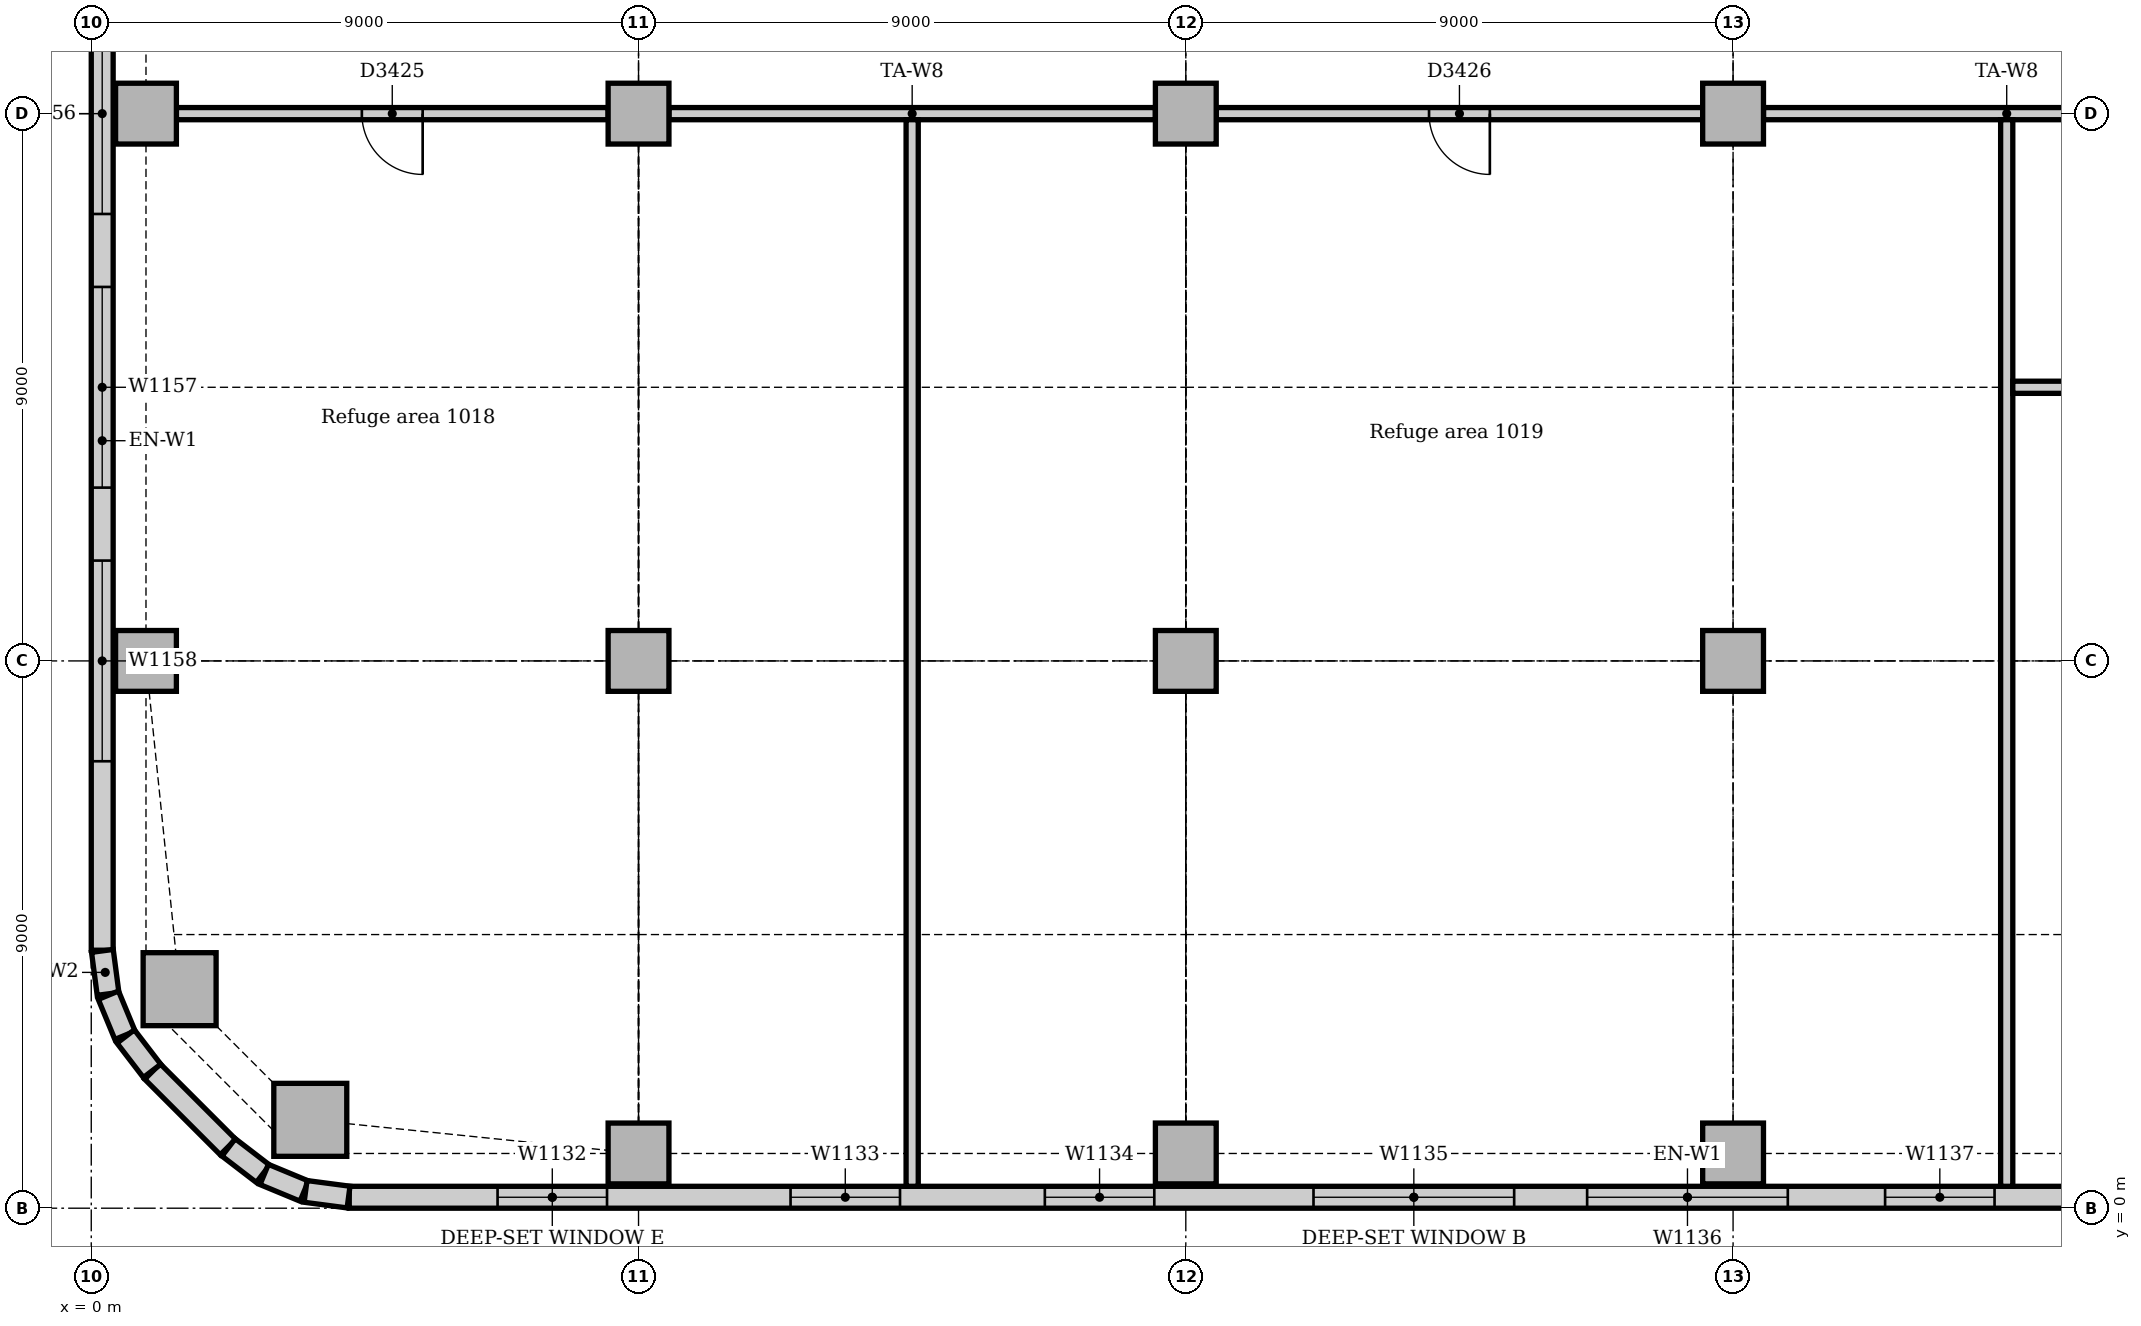
"""IFC4 building model, lengths in metres.
Left out: names, types, materials, properties, quantities, classifications, styles, units other than length and angle.
Written with IfcOpenShell. Run it as: python <this file> out.ifc"""

import sys

from ifc_helpers import new_model, si_unit, direction, frame, frame_2d, origin, origin_2d, place, context, subcontext, project, spatial, rectangle, extrude, element, fill, save


model = new_model("IFC4")
c1 = context("Model", 3, precision=1e-05, world=origin(), true_north=direction((0.0, 1.0)))
c2 = subcontext(c1, "Body", "Model", "MODEL_VIEW")
j1 = project(units=[si_unit("LENGTHUNIT", "METRE"), si_unit("PLANEANGLEUNIT", "RADIAN")], contexts=[c1])
p1 = place(None, origin())
s1 = spatial("IfcSite", under=j1, at=p1, CompositionType="ELEMENT")
p2 = place(p1, origin())
s2 = spatial("IfcBuilding", under=s1, at=p2, CompositionType="ELEMENT")
p3 = place(p2, frame((0.0, 0.0, 46.0)))
s3 = spatial("IfcBuildingStorey", under=s2, at=p3, CompositionType="ELEMENT", Elevation=46.0)
for number, where, z_axis, x_axis in (
    (1, (3.602, 1.453, 0.0), (0.0, 0.0, 1.0), (1.0, 0.0, 0.0)),
    (2, (1.453, 3.602, 0.0), (0.0, 0.0, 1.0), (1.0, 0.0, 0.0)),
):
    element("IfcColumn", number, at=place(p3, frame(where, z_axis=z_axis, x_axis=x_axis)), inside=s3, PredefinedType="COLUMN", context=c2, shape_type="SweptSolid", body=[
        extrude(rectangle(XDim=1.2, YDim=1.2, at=origin_2d()), origin(), (0.0, 0.0, 1.0), 4.85),
    ])
for number, where, z_axis, x_axis in (
    (3, (9.0, 0.9, 0.0), (0.0, 0.0, 1.0), (1.0, 0.0, 0.0)),
    (4, (18.0, 0.9, 0.0), (0.0, 0.0, 1.0), (1.0, 0.0, 0.0)),
    (5, (27.0, 0.9, 0.0), (0.0, 0.0, 1.0), (1.0, 0.0, 0.0)),
    (6, (0.9, 9.0, 0.0), (0.0, 0.0, 1.0), (1.0, 0.0, 0.0)),
    (7, (0.9, 18.0, 0.0), (0.0, 0.0, 1.0), (1.0, 0.0, 0.0)),
    (8, (9.0, 9.0, 0.0), (0.0, 0.0, 1.0), (1.0, 0.0, 0.0)),
    (9, (9.0, 18.0, 0.0), (0.0, 0.0, 1.0), (1.0, 0.0, 0.0)),
    (10, (18.0, 9.0, 0.0), (0.0, 0.0, 1.0), (1.0, 0.0, 0.0)),
    (11, (18.0, 18.0, 0.0), (0.0, 0.0, 1.0), (1.0, 0.0, 0.0)),
    (12, (27.0, 9.0, 0.0), (0.0, 0.0, 1.0), (1.0, 0.0, 0.0)),
    (13, (27.0, 18.0, 0.0), (0.0, 0.0, 1.0), (1.0, 0.0, 0.0)),
):
    element("IfcColumn", number, at=place(p3, frame(where, z_axis=z_axis, x_axis=x_axis)), inside=s3, PredefinedType="COLUMN", context=c2, shape_type="SweptSolid", body=[
        extrude(rectangle(XDim=1.0, YDim=1.0, at=origin_2d()), origin(), (0.0, 0.0, 1.0), 4.85),
    ])
p4 = place(p3, frame((4.243, 0.18, 0.0), z_axis=(0.0, 0.0, 1.0), x_axis=(1.0, 0.0, 0.0)))
e14 = element("IfcWall", 14, at=p4, inside=s3, PredefinedType="STANDARD", context=c2, shape_type="SweptSolid", body=[
    extrude(rectangle(XDim=44.015, YDim=0.36, at=frame_2d((22.007, 0.0))), origin(), (0.0, 0.0, 1.0), 4.85),
])
p5 = place(p4, frame((2.439, 0.0, 0.9)))
e15 = element("IfcOpeningElement", 15, at=p5, cuts=e14, PredefinedType="OPENING", context=c2, shape_type="SweptSolid", body=[
    extrude(rectangle(XDim=1.8, YDim=2.2, at=frame_2d((0.9, 1.1))), frame((0.0, 0.19, 0.0), z_axis=(0.0, -1.0, 0.0), x_axis=(1.0, 0.0, 0.0)), (0.0, 0.0, 1.0), 0.38),
])
p6 = place(p4, frame((7.257, 0.0, 0.9)))
e16 = element("IfcOpeningElement", 16, at=p6, cuts=e14, PredefinedType="OPENING", context=c2, shape_type="SweptSolid", body=[
    extrude(rectangle(XDim=1.8, YDim=2.2, at=frame_2d((0.9, 1.1))), frame((0.0, 0.19, 0.0), z_axis=(0.0, -1.0, 0.0), x_axis=(1.0, 0.0, 0.0)), (0.0, 0.0, 1.0), 0.38),
])
p7 = place(p4, frame((11.439, 0.0, 0.9)))
e17 = element("IfcOpeningElement", 17, at=p7, cuts=e14, PredefinedType="OPENING", context=c2, shape_type="SweptSolid", body=[
    extrude(rectangle(XDim=1.8, YDim=2.2, at=frame_2d((0.9, 1.1))), frame((0.0, 0.19, 0.0), z_axis=(0.0, -1.0, 0.0), x_axis=(1.0, 0.0, 0.0)), (0.0, 0.0, 1.0), 0.38),
])
p8 = place(p4, frame((15.857, 0.0, 0.9)))
e18 = element("IfcOpeningElement", 18, at=p8, cuts=e14, PredefinedType="OPENING", context=c2, shape_type="SweptSolid", body=[
    extrude(rectangle(XDim=3.3, YDim=2.2, at=frame_2d((1.65, 1.1))), frame((0.0, 0.19, 0.0), z_axis=(0.0, -1.0, 0.0), x_axis=(1.0, 0.0, 0.0)), (0.0, 0.0, 1.0), 0.38),
])
p9 = place(p4, frame((20.357, 0.0, 0.9)))
e19 = element("IfcOpeningElement", 19, at=p9, cuts=e14, PredefinedType="OPENING", context=c2, shape_type="SweptSolid", body=[
    extrude(rectangle(XDim=3.3, YDim=2.2, at=frame_2d((1.65, 1.1))), frame((0.0, 0.19, 0.0), z_axis=(0.0, -1.0, 0.0), x_axis=(1.0, 0.0, 0.0)), (0.0, 0.0, 1.0), 0.38),
])
p10 = place(p4, frame((25.257, 0.0, 0.9)))
e20 = element("IfcOpeningElement", 20, at=p10, cuts=e14, PredefinedType="OPENING", context=c2, shape_type="SweptSolid", body=[
    extrude(rectangle(XDim=1.8, YDim=2.2, at=frame_2d((0.9, 1.1))), frame((0.0, 0.19, 0.0), z_axis=(0.0, -1.0, 0.0), x_axis=(1.0, 0.0, 0.0)), (0.0, 0.0, 1.0), 0.38),
])
p11 = place(p4, frame((29.357, 0.0, 0.9)))
e21 = element("IfcOpeningElement", 21, at=p11, cuts=e14, PredefinedType="OPENING", context=c2, shape_type="SweptSolid", body=[
    extrude(rectangle(XDim=3.3, YDim=2.2, at=frame_2d((1.65, 1.1))), frame((0.0, 0.19, 0.0), z_axis=(0.0, -1.0, 0.0), x_axis=(1.0, 0.0, 0.0)), (0.0, 0.0, 1.0), 0.38),
])
p12 = place(p4, frame((34.207, 0.0, 0.9)))
e22 = element("IfcOpeningElement", 22, at=p12, cuts=e14, PredefinedType="OPENING", context=c2, shape_type="SweptSolid", body=[
    extrude(rectangle(XDim=3.3, YDim=2.2, at=frame_2d((1.65, 1.1))), frame((0.0, 0.19, 0.0), z_axis=(0.0, -1.0, 0.0), x_axis=(1.0, 0.0, 0.0)), (0.0, 0.0, 1.0), 0.38),
])
p13 = place(p4, frame((38.357, 0.0, 0.9)))
e23 = element("IfcOpeningElement", 23, at=p13, cuts=e14, PredefinedType="OPENING", context=c2, shape_type="SweptSolid", body=[
    extrude(rectangle(XDim=3.3, YDim=2.2, at=frame_2d((1.65, 1.1))), frame((0.0, 0.19, 0.0), z_axis=(0.0, -1.0, 0.0), x_axis=(1.0, 0.0, 0.0)), (0.0, 0.0, 1.0), 0.38),
])
p14 = place(p3, frame((0.18, 21.0, 0.0), z_axis=(0.0, 0.0, 1.0), x_axis=(0.0, -1.0, 0.0)))
e24 = element("IfcWall", 24, at=p14, inside=s3, PredefinedType="STANDARD", context=c2, shape_type="SweptSolid", body=[
    extrude(rectangle(XDim=16.757, YDim=0.36, at=frame_2d((8.379, 0.0))), origin(), (0.0, 0.0, 1.0), 4.85),
])
p15 = place(p14, frame((1.35, 0.0, 0.9)))
e25 = element("IfcOpeningElement", 25, at=p15, cuts=e24, PredefinedType="OPENING", context=c2, shape_type="SweptSolid", body=[
    extrude(rectangle(XDim=3.3, YDim=2.2, at=frame_2d((1.65, 1.1))), frame((0.0, 0.19, 0.0), z_axis=(0.0, -1.0, 0.0), x_axis=(1.0, 0.0, 0.0)), (0.0, 0.0, 1.0), 0.38),
])
p16 = place(p14, frame((5.85, 0.0, 0.9)))
e26 = element("IfcOpeningElement", 26, at=p16, cuts=e24, PredefinedType="OPENING", context=c2, shape_type="SweptSolid", body=[
    extrude(rectangle(XDim=3.3, YDim=2.2, at=frame_2d((1.65, 1.1))), frame((0.0, 0.19, 0.0), z_axis=(0.0, -1.0, 0.0), x_axis=(1.0, 0.0, 0.0)), (0.0, 0.0, 1.0), 0.38),
])
p17 = place(p14, frame((10.35, 0.0, 0.9)))
e27 = element("IfcOpeningElement", 27, at=p17, cuts=e24, PredefinedType="OPENING", context=c2, shape_type="SweptSolid", body=[
    extrude(rectangle(XDim=3.3, YDim=2.2, at=frame_2d((1.65, 1.1))), frame((0.0, 0.19, 0.0), z_axis=(0.0, -1.0, 0.0), x_axis=(1.0, 0.0, 0.0)), (0.0, 0.0, 1.0), 0.38),
])
p18 = place(p3, frame((1.006, 2.249, 0.0), z_axis=(0.0, 0.0, 1.0), x_axis=(0.707106781187, -0.707106781187, 0.0)))
e28 = element("IfcWall", 28, at=p18, inside=s3, PredefinedType="STANDARD", context=c2, shape_type="SweptSolid", body=[
    extrude(rectangle(XDim=1.757, YDim=0.36, at=frame_2d((0.879, 0.0))), origin(), (0.0, 0.0, 1.0), 4.85),
])
for number, where, z_axis, x_axis in (
    (29, (0.183, 4.231, 0.0), (0.0, 0.0, 1.0), (0.131, -0.991, 0.0)),
    (30, (0.282, 3.503, 0.0), (0.0, 0.0, 1.0), (0.383, -0.924, 0.0)),
):
    element("IfcWall", number, at=place(p3, frame(where, z_axis=z_axis, x_axis=x_axis)), inside=s3, PredefinedType="STANDARD", context=c2, shape_type="SweptSolid", body=[
        extrude(rectangle(XDim=0.713, YDim=0.36, at=frame_2d((0.356, 0.0))), origin(), (0.0, 0.0, 1.0), 4.85),
    ])
for number, where, z_axis, x_axis in (
    (31, (0.566, 2.825, 0.0), (0.0, 0.0, 1.0), (0.609, -0.793, 0.0)),
    (32, (2.259, 1.0, 0.0), (0.0, 0.0, 1.0), (0.793, -0.609, 0.0)),
):
    element("IfcWall", number, at=place(p3, frame(where, z_axis=z_axis, x_axis=x_axis)), inside=s3, PredefinedType="STANDARD", context=c2, shape_type="SweptSolid", body=[
        extrude(rectangle(XDim=0.713, YDim=0.36, at=frame_2d((0.357, 0.0))), origin(), (0.0, 0.0, 1.0), 4.85),
    ])
for number, where, z_axis, x_axis in (
    (33, (2.844, 0.555, 0.0), (0.0, 0.0, 1.0), (0.924, -0.383, 0.0)),
    (34, (3.524, 0.276, 0.0), (0.0, 0.0, 1.0), (0.991, -0.131, 0.0)),
):
    element("IfcWall", number, at=place(p3, frame(where, z_axis=z_axis, x_axis=x_axis)), inside=s3, PredefinedType="STANDARD", context=c2, shape_type="SweptSolid", body=[
        extrude(rectangle(XDim=0.713, YDim=0.36, at=frame_2d((0.356, 0.0))), origin(), (0.0, 0.0, 1.0), 4.85),
    ])
p19 = place(p3, frame((27.5, 18.0, 0.0), z_axis=(0.0, 0.0, 1.0), x_axis=(1.0, 0.0, 0.0)))
e35 = element("IfcWall", 35, at=p19, inside=s3, PredefinedType="PARTITIONING", context=c2, shape_type="SweptSolid", body=[
    extrude(rectangle(XDim=8.0, YDim=0.2, at=frame_2d((4.0, 0.0))), origin(), (0.0, 0.0, 1.0), 4.15),
])
p20 = place(p3, frame((18.5, 18.0, 0.0), z_axis=(0.0, 0.0, 1.0), x_axis=(1.0, 0.0, 0.0)))
e36 = element("IfcWall", 36, at=p20, inside=s3, PredefinedType="PARTITIONING", context=c2, shape_type="SweptSolid", body=[
    extrude(rectangle(XDim=8.0, YDim=0.2, at=frame_2d((4.0, 0.0))), origin(), (0.0, 0.0, 1.0), 4.15),
])
p21 = place(p20, frame((3.5, 0.0, 0.0)))
e37 = element("IfcOpeningElement", 37, at=p21, cuts=e36, PredefinedType="OPENING", context=c2, shape_type="SweptSolid", body=[
    extrude(rectangle(XDim=1.0, YDim=2.1, at=frame_2d((0.5, 1.05))), frame((0.0, 0.11, 0.0), z_axis=(0.0, -1.0, 0.0), x_axis=(1.0, 0.0, 0.0)), (0.0, 0.0, 1.0), 0.22),
])
p22 = place(p3, frame((9.5, 18.0, 0.0), z_axis=(0.0, 0.0, 1.0), x_axis=(1.0, 0.0, 0.0)))
e38 = element("IfcWall", 38, at=p22, inside=s3, PredefinedType="PARTITIONING", context=c2, shape_type="SweptSolid", body=[
    extrude(rectangle(XDim=8.0, YDim=0.2, at=frame_2d((4.0, 0.0))), origin(), (0.0, 0.0, 1.0), 4.15),
])
p23 = place(p3, frame((1.4, 18.0, 0.0), z_axis=(0.0, 0.0, 1.0), x_axis=(1.0, 0.0, 0.0)))
e39 = element("IfcWall", 39, at=p23, inside=s3, PredefinedType="PARTITIONING", context=c2, shape_type="SweptSolid", body=[
    extrude(rectangle(XDim=7.1, YDim=0.2, at=frame_2d((3.55, 0.0))), origin(), (0.0, 0.0, 1.0), 4.15),
])
p24 = place(p23, frame((3.05, 0.0, 0.0)))
e40 = element("IfcOpeningElement", 40, at=p24, cuts=e39, PredefinedType="OPENING", context=c2, shape_type="SweptSolid", body=[
    extrude(rectangle(XDim=1.0, YDim=2.1, at=frame_2d((0.5, 1.05))), frame((0.0, 0.11, 0.0), z_axis=(0.0, -1.0, 0.0), x_axis=(1.0, 0.0, 0.0)), (0.0, 0.0, 1.0), 0.22),
])
for number, where, z_axis, x_axis in (
    (41, (13.5, 0.36, 0.0), (0.0, 0.0, 1.0), (0.0, 1.0, 0.0)),
    (42, (31.5, 0.36, 0.0), (0.0, 0.0, 1.0), (0.0, 1.0, 0.0)),
):
    element("IfcWall", number, at=place(p3, frame(where, z_axis=z_axis, x_axis=x_axis)), inside=s3, PredefinedType="PARTITIONING", context=c2, shape_type="SweptSolid", body=[
        extrude(rectangle(XDim=17.54, YDim=0.2, at=frame_2d((8.77, 0.0))), origin(), (0.0, 0.0, 1.0), 4.85),
    ])
p25 = place(p3, frame((31.6, 13.5, 0.0), z_axis=(0.0, 0.0, 1.0), x_axis=(1.0, 0.0, 0.0)))
e43 = element("IfcWall", 43, at=p25, inside=s3, PredefinedType="PARTITIONING", context=c2, shape_type="SweptSolid", body=[
    extrude(rectangle(XDim=13.3, YDim=0.2, at=frame_2d((6.65, 0.0))), origin(), (0.0, 0.0, 1.0), 4.35),
])
p26 = place(p25, frame((2.9, 0.0, 0.0)))
e44 = element("IfcOpeningElement", 44, at=p26, cuts=e43, PredefinedType="OPENING", context=c2, shape_type="SweptSolid", body=[
    extrude(rectangle(XDim=1.0, YDim=2.1, at=frame_2d((0.5, 1.05))), frame((0.0, 0.11, 0.0), z_axis=(0.0, -1.0, 0.0), x_axis=(1.0, 0.0, 0.0)), (0.0, 0.0, 1.0), 0.22),
])
p27 = place(p25, frame((9.4, 0.0, 0.0)))
e45 = element("IfcOpeningElement", 45, at=p27, cuts=e43, PredefinedType="OPENING", context=c2, shape_type="SweptSolid", body=[
    extrude(rectangle(XDim=1.0, YDim=2.1, at=frame_2d((0.5, 1.05))), frame((0.0, 0.11, 0.0), z_axis=(0.0, -1.0, 0.0), x_axis=(1.0, 0.0, 0.0)), (0.0, 0.0, 1.0), 0.22),
])
p28 = place(p5, origin())
e46 = element("IfcWindow", 46, at=p28, inside=s3, PartitioningType="SINGLE_PANEL", PredefinedType="WINDOW", context=c2, shape_type="SweptSolid", body=[
    extrude(rectangle(XDim=1.8, YDim=2.2, at=frame_2d((0.9, 1.1))), frame((0.0, 0.13, 0.0), z_axis=(0.0, -1.0, 0.0), x_axis=(1.0, 0.0, 0.0)), (0.0, 0.0, 1.0), 0.06),
])
fill(e15, e46)
p29 = place(p6, origin())
e47 = element("IfcWindow", 47, at=p29, inside=s3, PartitioningType="SINGLE_PANEL", PredefinedType="WINDOW", context=c2, shape_type="SweptSolid", body=[
    extrude(rectangle(XDim=1.8, YDim=2.2, at=frame_2d((0.9, 1.1))), frame((0.0, 0.13, 0.0), z_axis=(0.0, -1.0, 0.0), x_axis=(1.0, 0.0, 0.0)), (0.0, 0.0, 1.0), 0.06),
])
fill(e16, e47)
p30 = place(p7, origin())
e48 = element("IfcWindow", 48, at=p30, inside=s3, PartitioningType="SINGLE_PANEL", PredefinedType="WINDOW", context=c2, shape_type="SweptSolid", body=[
    extrude(rectangle(XDim=1.8, YDim=2.2, at=frame_2d((0.9, 1.1))), frame((0.0, 0.13, 0.0), z_axis=(0.0, -1.0, 0.0), x_axis=(1.0, 0.0, 0.0)), (0.0, 0.0, 1.0), 0.06),
])
fill(e17, e48)
p31 = place(p8, origin())
e49 = element("IfcWindow", 49, at=p31, inside=s3, PartitioningType="SINGLE_PANEL", PredefinedType="WINDOW", context=c2, shape_type="SweptSolid", body=[
    extrude(rectangle(XDim=3.3, YDim=2.2, at=frame_2d((1.65, 1.1))), frame((0.0, 0.13, 0.0), z_axis=(0.0, -1.0, 0.0), x_axis=(1.0, 0.0, 0.0)), (0.0, 0.0, 1.0), 0.06),
])
fill(e18, e49)
p32 = place(p9, origin())
e50 = element("IfcWindow", 50, at=p32, inside=s3, PartitioningType="SINGLE_PANEL", PredefinedType="WINDOW", context=c2, shape_type="SweptSolid", body=[
    extrude(rectangle(XDim=3.3, YDim=2.2, at=frame_2d((1.65, 1.1))), frame((0.0, 0.13, 0.0), z_axis=(0.0, -1.0, 0.0), x_axis=(1.0, 0.0, 0.0)), (0.0, 0.0, 1.0), 0.06),
])
fill(e19, e50)
p33 = place(p10, origin())
e51 = element("IfcWindow", 51, at=p33, inside=s3, PartitioningType="SINGLE_PANEL", PredefinedType="WINDOW", context=c2, shape_type="SweptSolid", body=[
    extrude(rectangle(XDim=1.8, YDim=2.2, at=frame_2d((0.9, 1.1))), frame((0.0, 0.13, 0.0), z_axis=(0.0, -1.0, 0.0), x_axis=(1.0, 0.0, 0.0)), (0.0, 0.0, 1.0), 0.06),
])
fill(e20, e51)
p34 = place(p15, origin())
e52 = element("IfcWindow", 52, at=p34, inside=s3, PartitioningType="SINGLE_PANEL", PredefinedType="WINDOW", context=c2, shape_type="SweptSolid", body=[
    extrude(rectangle(XDim=3.3, YDim=2.2, at=frame_2d((1.65, 1.1))), frame((0.0, 0.13, 0.0), z_axis=(0.0, -1.0, 0.0), x_axis=(1.0, 0.0, 0.0)), (0.0, 0.0, 1.0), 0.06),
])
fill(e25, e52)
p35 = place(p16, origin())
e53 = element("IfcWindow", 53, at=p35, inside=s3, PartitioningType="SINGLE_PANEL", PredefinedType="WINDOW", context=c2, shape_type="SweptSolid", body=[
    extrude(rectangle(XDim=3.3, YDim=2.2, at=frame_2d((1.65, 1.1))), frame((0.0, 0.13, 0.0), z_axis=(0.0, -1.0, 0.0), x_axis=(1.0, 0.0, 0.0)), (0.0, 0.0, 1.0), 0.06),
])
fill(e26, e53)
p36 = place(p17, origin())
e54 = element("IfcWindow", 54, at=p36, inside=s3, PartitioningType="SINGLE_PANEL", PredefinedType="WINDOW", context=c2, shape_type="SweptSolid", body=[
    extrude(rectangle(XDim=3.3, YDim=2.2, at=frame_2d((1.65, 1.1))), frame((0.0, 0.13, 0.0), z_axis=(0.0, -1.0, 0.0), x_axis=(1.0, 0.0, 0.0)), (0.0, 0.0, 1.0), 0.06),
])
fill(e27, e54)
p37 = place(p24, frame((1.0, 0.0, 0.0), z_axis=(0.0, 0.0, 1.0), x_axis=(-1.0, 0.0, 0.0)))
e55 = element("IfcDoor", 55, at=p37, inside=s3, OperationType="SINGLE_SWING_LEFT", PredefinedType="DOOR", context=c2, shape_type="SweptSolid", body=[
    extrude(rectangle(XDim=1.0, YDim=2.1, at=frame_2d((0.5, 1.05))), frame((0.0, 0.025, 0.0), z_axis=(0.0, -1.0, 0.0), x_axis=(1.0, 0.0, 0.0)), (0.0, 0.0, 1.0), 0.05),
])
fill(e40, e55)
p38 = place(p21, frame((1.0, 0.0, 0.0), z_axis=(0.0, 0.0, 1.0), x_axis=(-1.0, 0.0, 0.0)))
e56 = element("IfcDoor", 56, at=p38, inside=s3, OperationType="SINGLE_SWING_LEFT", PredefinedType="DOOR", context=c2, shape_type="SweptSolid", body=[
    extrude(rectangle(XDim=1.0, YDim=2.1, at=frame_2d((0.5, 1.05))), frame((0.0, 0.025, 0.0), z_axis=(0.0, -1.0, 0.0), x_axis=(1.0, 0.0, 0.0)), (0.0, 0.0, 1.0), 0.05),
])
fill(e37, e56)
save(model, sys.argv[1])
